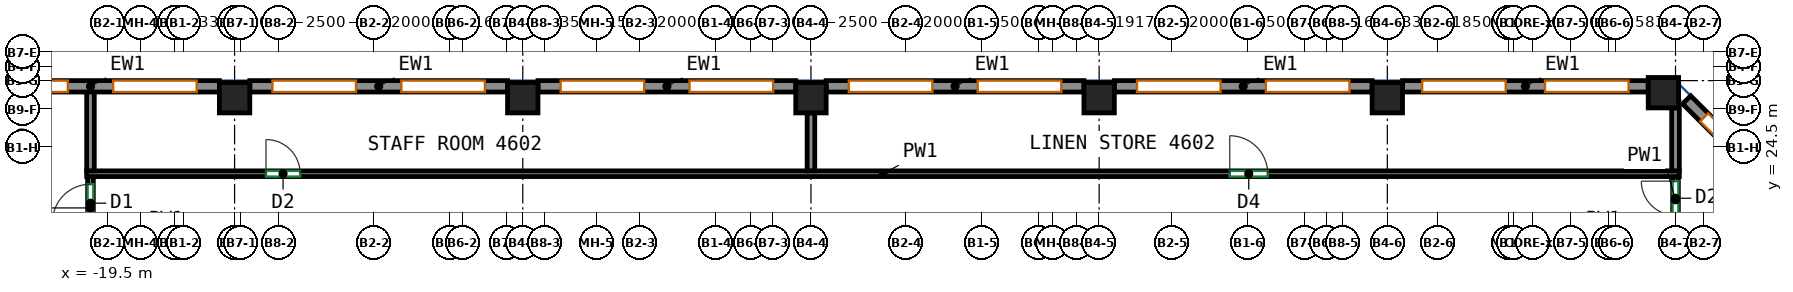
"""IFC4 building model, lengths in metres.
Left out: names, types, materials, properties, quantities, classifications, styles, units other than length and angle.
Written with IfcOpenShell. Run it as: python <this file> out.ifc"""

import sys

from ifc_helpers import new_model, si_unit, direction, frame, frame_2d, origin, origin_2d, place, context, subcontext, project, spatial, rectangle, extrude, source, transform, mapped, element, fill, save


model = new_model("IFC4")
c1 = context("Model", 3, precision=1e-05, world=origin(), true_north=direction((0.0, 1.0)))
c2 = subcontext(c1, "Body", "Model", "MODEL_VIEW")
j1 = project(units=[si_unit("LENGTHUNIT", "METRE"), si_unit("PLANEANGLEUNIT", "RADIAN")], contexts=[c1])
p1 = place(None, origin())
s1 = spatial("IfcSite", under=j1, at=p1, CompositionType="ELEMENT")
p2 = place(p1, origin())
s2 = spatial("IfcBuilding", under=s1, at=p2, CompositionType="ELEMENT")
p3 = place(p2, frame((0.0, 0.0, 192.3)))
s3 = spatial("IfcBuildingStorey", under=s2, at=p3, CompositionType="ELEMENT", Elevation=192.3)
m1 = source(origin(), c2, "Body", "SweptSolid", [
    extrude(rectangle(XDim=0.8, YDim=0.8, at=origin_2d()), origin(), (0.0, 0.0, 1.0), 3.0),
])
for number, where, z_axis, x_axis in (
    (1, (-16.167, 25.8, 0.0), (0.0, 0.0, 1.0), (1.0, 0.0, 0.0)),
    (2, (-8.583, 25.8, 0.0), (0.0, 0.0, 1.0), (1.0, 0.0, 0.0)),
    (3, (-1.0, 25.8, 0.0), (0.0, 0.0, 1.0), (1.0, 0.0, 0.0)),
    (4, (6.583, 25.8, 0.0), (0.0, 0.0, 1.0), (1.0, 0.0, 0.0)),
    (5, (14.167, 25.8, 0.0), (0.0, 0.0, 1.0), (1.0, 0.0, 0.0)),
    (6, (21.432, 25.932, 0.0), (0.0, 0.0, 1.0), (1.0, 0.0, 0.0)),
):
    element("IfcColumn", number, at=place(p3, frame(where, z_axis=z_axis, x_axis=x_axis)), inside=s3, PredefinedType="COLUMN", context=c2, shape_type="MappedRepresentation", body=[
        mapped(m1, transform((0.0, 0.0, 0.0))),
    ])
m2 = source(origin(), c2, "Body", "SweptSolid", [
    extrude(rectangle(XDim=3.5, YDim=0.3, at=frame_2d((1.75, 0.0))), origin(), (0.0, 0.0, 1.0), 3.0),
])
p4 = place(p3, frame((24.519, 23.269, 0.0), z_axis=(0.0, 0.0, 1.0), x_axis=(-0.70707190453, 0.707141656123, 0.0)))
e7 = element("IfcWall", 7, at=p4, inside=s3, PredefinedType="SOLIDWALL", context=c2, shape_type="MappedRepresentation", body=[
    mapped(m2, transform((0.0, 0.0, 0.0))),
])
p5 = place(p4, frame((0.65, 0.0, 0.85)))
e8 = element("IfcOpeningElement", 8, at=p5, cuts=e7, PredefinedType="OPENING", context=c2, shape_type="SweptSolid", body=[
    extrude(rectangle(XDim=2.2, YDim=1.95, at=frame_2d((1.1, 0.975))), frame((0.0, 0.16, 0.0), z_axis=(0.0, -1.0, 0.0), x_axis=(1.0, 0.0, 0.0)), (0.0, 0.0, 1.0), 0.32),
])
m3 = source(origin(), c2, "Body", "SweptSolid", [
    extrude(rectangle(XDim=6.465, YDim=0.3, at=frame_2d((3.232, 0.0))), origin(), (0.0, 0.0, 1.0), 3.0),
])
p6 = place(p3, frame((21.032, 26.1, 0.0), z_axis=(0.0, 0.0, 1.0), x_axis=(-1.0, 0.0, 0.0)))
e9 = element("IfcWall", 9, at=p6, inside=s3, PredefinedType="SOLIDWALL", context=c2, shape_type="MappedRepresentation", body=[
    mapped(m3, transform((0.0, 0.0, 0.0))),
])
p7 = place(p6, frame((0.516, 0.0, 0.85)))
e10 = element("IfcOpeningElement", 10, at=p7, cuts=e9, PredefinedType="OPENING", context=c2, shape_type="SweptSolid", body=[
    extrude(rectangle(XDim=2.2, YDim=1.95, at=frame_2d((1.1, 0.975))), frame((0.0, 0.16, 0.0), z_axis=(0.0, -1.0, 0.0), x_axis=(1.0, 0.0, 0.0)), (0.0, 0.0, 1.0), 0.32),
])
p8 = place(p6, frame((3.749, 0.0, 0.85)))
e11 = element("IfcOpeningElement", 11, at=p8, cuts=e9, PredefinedType="OPENING", context=c2, shape_type="SweptSolid", body=[
    extrude(rectangle(XDim=2.2, YDim=1.95, at=frame_2d((1.1, 0.975))), frame((0.0, 0.16, 0.0), z_axis=(0.0, -1.0, 0.0), x_axis=(1.0, 0.0, 0.0)), (0.0, 0.0, 1.0), 0.32),
])
m4 = source(origin(), c2, "Body", "SweptSolid", [
    extrude(rectangle(XDim=6.783, YDim=0.3, at=frame_2d((3.392, 0.0))), origin(), (0.0, 0.0, 1.0), 3.0),
])
p9 = place(p3, frame((13.767, 26.1, 0.0), z_axis=(0.0, 0.0, 1.0), x_axis=(-1.0, 0.0, 0.0)))
e12 = element("IfcWall", 12, at=p9, inside=s3, PredefinedType="SOLIDWALL", context=c2, shape_type="MappedRepresentation", body=[
    mapped(m4, transform((0.0, 0.0, 0.0))),
])
p10 = place(p9, frame((0.596, 0.0, 0.85)))
e13 = element("IfcOpeningElement", 13, at=p10, cuts=e12, PredefinedType="OPENING", context=c2, shape_type="SweptSolid", body=[
    extrude(rectangle(XDim=2.2, YDim=1.95, at=frame_2d((1.1, 0.975))), frame((0.0, 0.16, 0.0), z_axis=(0.0, -1.0, 0.0), x_axis=(1.0, 0.0, 0.0)), (0.0, 0.0, 1.0), 0.32),
])
p11 = place(p9, frame((3.988, 0.0, 0.85)))
e14 = element("IfcOpeningElement", 14, at=p11, cuts=e12, PredefinedType="OPENING", context=c2, shape_type="SweptSolid", body=[
    extrude(rectangle(XDim=2.2, YDim=1.95, at=frame_2d((1.1, 0.975))), frame((0.0, 0.16, 0.0), z_axis=(0.0, -1.0, 0.0), x_axis=(1.0, 0.0, 0.0)), (0.0, 0.0, 1.0), 0.32),
])
m5 = source(origin(), c2, "Body", "SweptSolid", [
    extrude(rectangle(XDim=6.783, YDim=0.3, at=frame_2d((3.392, 0.0))), origin(), (0.0, 0.0, 1.0), 3.0),
])
p12 = place(p3, frame((6.183, 26.1, 0.0), z_axis=(0.0, 0.0, 1.0), x_axis=(-1.0, 0.0, 0.0)))
e15 = element("IfcWall", 15, at=p12, inside=s3, PredefinedType="SOLIDWALL", context=c2, shape_type="MappedRepresentation", body=[
    mapped(m5, transform((0.0, 0.0, 0.0))),
])
p13 = place(p12, frame((0.596, 0.0, 0.85)))
e16 = element("IfcOpeningElement", 16, at=p13, cuts=e15, PredefinedType="OPENING", context=c2, shape_type="SweptSolid", body=[
    extrude(rectangle(XDim=2.2, YDim=1.95, at=frame_2d((1.1, 0.975))), frame((0.0, 0.16, 0.0), z_axis=(0.0, -1.0, 0.0), x_axis=(1.0, 0.0, 0.0)), (0.0, 0.0, 1.0), 0.32),
])
p14 = place(p12, frame((3.988, 0.0, 0.85)))
e17 = element("IfcOpeningElement", 17, at=p14, cuts=e15, PredefinedType="OPENING", context=c2, shape_type="SweptSolid", body=[
    extrude(rectangle(XDim=2.2, YDim=1.95, at=frame_2d((1.1, 0.975))), frame((0.0, 0.16, 0.0), z_axis=(0.0, -1.0, 0.0), x_axis=(1.0, 0.0, 0.0)), (0.0, 0.0, 1.0), 0.32),
])
p15 = place(p3, frame((-1.4, 26.1, 0.0), z_axis=(0.0, 0.0, 1.0), x_axis=(-1.0, 0.0, 0.0)))
e18 = element("IfcWall", 18, at=p15, inside=s3, PredefinedType="SOLIDWALL", context=c2, shape_type="MappedRepresentation", body=[
    mapped(m5, transform((0.0, 0.0, 0.0))),
])
p16 = place(p15, frame((0.596, 0.0, 0.85)))
e19 = element("IfcOpeningElement", 19, at=p16, cuts=e18, PredefinedType="OPENING", context=c2, shape_type="SweptSolid", body=[
    extrude(rectangle(XDim=2.2, YDim=1.95, at=frame_2d((1.1, 0.975))), frame((0.0, 0.16, 0.0), z_axis=(0.0, -1.0, 0.0), x_axis=(1.0, 0.0, 0.0)), (0.0, 0.0, 1.0), 0.32),
])
p17 = place(p15, frame((3.988, 0.0, 0.85)))
e20 = element("IfcOpeningElement", 20, at=p17, cuts=e18, PredefinedType="OPENING", context=c2, shape_type="SweptSolid", body=[
    extrude(rectangle(XDim=2.2, YDim=1.95, at=frame_2d((1.1, 0.975))), frame((0.0, 0.16, 0.0), z_axis=(0.0, -1.0, 0.0), x_axis=(1.0, 0.0, 0.0)), (0.0, 0.0, 1.0), 0.32),
])
p18 = place(p3, frame((-8.983, 26.1, 0.0), z_axis=(0.0, 0.0, 1.0), x_axis=(-1.0, 0.0, 0.0)))
e21 = element("IfcWall", 21, at=p18, inside=s3, PredefinedType="SOLIDWALL", context=c2, shape_type="MappedRepresentation", body=[
    mapped(m4, transform((0.0, 0.0, 0.0))),
])
p19 = place(p18, frame((0.596, 0.0, 0.85)))
e22 = element("IfcOpeningElement", 22, at=p19, cuts=e21, PredefinedType="OPENING", context=c2, shape_type="SweptSolid", body=[
    extrude(rectangle(XDim=2.2, YDim=1.95, at=frame_2d((1.1, 0.975))), frame((0.0, 0.16, 0.0), z_axis=(0.0, -1.0, 0.0), x_axis=(1.0, 0.0, 0.0)), (0.0, 0.0, 1.0), 0.32),
])
p20 = place(p18, frame((3.988, 0.0, 0.85)))
e23 = element("IfcOpeningElement", 23, at=p20, cuts=e21, PredefinedType="OPENING", context=c2, shape_type="SweptSolid", body=[
    extrude(rectangle(XDim=2.2, YDim=1.95, at=frame_2d((1.1, 0.975))), frame((0.0, 0.16, 0.0), z_axis=(0.0, -1.0, 0.0), x_axis=(1.0, 0.0, 0.0)), (0.0, 0.0, 1.0), 0.32),
])
p21 = place(p3, frame((-16.567, 26.1, 0.0), z_axis=(0.0, 0.0, 1.0), x_axis=(-1.0, 0.0, 0.0)))
e24 = element("IfcWall", 24, at=p21, inside=s3, PredefinedType="SOLIDWALL", context=c2, shape_type="MappedRepresentation", body=[
    mapped(m5, transform((0.0, 0.0, 0.0))),
])
p22 = place(p21, frame((0.596, 0.0, 0.85)))
e25 = element("IfcOpeningElement", 25, at=p22, cuts=e24, PredefinedType="OPENING", context=c2, shape_type="SweptSolid", body=[
    extrude(rectangle(XDim=2.2, YDim=1.95, at=frame_2d((1.1, 0.975))), frame((0.0, 0.16, 0.0), z_axis=(0.0, -1.0, 0.0), x_axis=(1.0, 0.0, 0.0)), (0.0, 0.0, 1.0), 0.32),
])
p23 = place(p21, frame((3.988, 0.0, 0.85)))
e26 = element("IfcOpeningElement", 26, at=p23, cuts=e24, PredefinedType="OPENING", context=c2, shape_type="SweptSolid", body=[
    extrude(rectangle(XDim=2.2, YDim=1.95, at=frame_2d((1.1, 0.975))), frame((0.0, 0.16, 0.0), z_axis=(0.0, -1.0, 0.0), x_axis=(1.0, 0.0, 0.0)), (0.0, 0.0, 1.0), 0.32),
])
p24 = place(p3, frame((-19.959, 22.075, 0.0), z_axis=(0.0, 0.0, 1.0), x_axis=(0.0, 1.0, 0.0)))
e27 = element("IfcWall", 27, at=p24, inside=s3, PredefinedType="PARTITIONING", context=c2, shape_type="SweptSolid", body=[
    extrude(rectangle(XDim=1.65, YDim=0.15, at=frame_2d((0.825, 0.0))), origin(), (0.0, 0.0, 1.0), 3.0),
])
p25 = place(p24, frame((0.45, 0.0, 0.0)))
e28 = element("IfcOpeningElement", 28, at=p25, cuts=e27, PredefinedType="OPENING", context=c2, shape_type="SweptSolid", body=[
    extrude(rectangle(XDim=1.0, YDim=2.1, at=frame_2d((0.5, 1.05))), frame((0.0, 0.085, 0.0), z_axis=(0.0, -1.0, 0.0), x_axis=(1.0, 0.0, 0.0)), (0.0, 0.0, 1.0), 0.17),
])
p26 = place(p3, frame((21.75, 22.503, 0.0), z_axis=(0.0, 0.0, 1.0), x_axis=(0.0, 1.0, 0.0)))
e29 = element("IfcWall", 29, at=p26, inside=s3, PredefinedType="PARTITIONING", context=c2, shape_type="SweptSolid", body=[
    extrude(rectangle(XDim=1.222, YDim=0.15, at=frame_2d((0.611, 0.0))), origin(), (0.0, 0.0, 1.0), 3.0),
])
p27 = place(p26, frame((0.202, 0.0, 0.0)))
e30 = element("IfcOpeningElement", 30, at=p27, cuts=e29, PredefinedType="OPENING", context=c2, shape_type="SweptSolid", body=[
    extrude(rectangle(XDim=0.9, YDim=2.1, at=frame_2d((0.45, 1.05))), frame((0.0, 0.085, 0.0), z_axis=(0.0, -1.0, 0.0), x_axis=(1.0, 0.0, 0.0)), (0.0, 0.0, 1.0), 0.17),
])
p28 = place(p3, frame((-20.059, 23.8, 0.0), z_axis=(0.0, 0.0, 1.0), x_axis=(1.0, 0.0, 0.0)))
e31 = element("IfcWall", 31, at=p28, inside=s3, PredefinedType="PARTITIONING", context=c2, shape_type="SweptSolid", body=[
    extrude(rectangle(XDim=41.909, YDim=0.15, at=frame_2d((20.955, 0.0))), origin(), (0.0, 0.0, 1.0), 3.0),
])
p29 = place(p28, frame((4.718, 0.0, 0.0)))
e32 = element("IfcOpeningElement", 32, at=p29, cuts=e31, PredefinedType="OPENING", context=c2, shape_type="SweptSolid", body=[
    extrude(rectangle(XDim=0.9, YDim=2.1, at=frame_2d((0.45, 1.05))), frame((0.0, 0.085, 0.0), z_axis=(0.0, -1.0, 0.0), x_axis=(1.0, 0.0, 0.0)), (0.0, 0.0, 1.0), 0.17),
])
p30 = place(p28, frame((30.079, 0.0, 0.0)))
e33 = element("IfcOpeningElement", 33, at=p30, cuts=e31, PredefinedType="OPENING", context=c2, shape_type="SweptSolid", body=[
    extrude(rectangle(XDim=1.0, YDim=2.1, at=frame_2d((0.5, 1.05))), frame((0.0, 0.085, 0.0), z_axis=(0.0, -1.0, 0.0), x_axis=(1.0, 0.0, 0.0)), (0.0, 0.0, 1.0), 0.17),
])
p31 = place(p3, frame((-19.959, 23.877, 0.0), z_axis=(0.0, 0.0, 1.0), x_axis=(0.0, 1.0, 0.0)))
e34 = element("IfcWall", 34, at=p31, inside=s3, PredefinedType="PARTITIONING", context=c2, shape_type="SweptSolid", body=[
    extrude(rectangle(XDim=2.123, YDim=0.2, at=frame_2d((1.062, 0.0))), origin(), (0.0, 0.0, 1.0), 3.0),
])
p32 = place(p3, frame((21.75, 25.532, 0.0), z_axis=(0.0, 0.0, 1.0), x_axis=(0.0, -1.0, 0.0)))
e35 = element("IfcWall", 35, at=p32, inside=s3, PredefinedType="PARTITIONING", context=c2, shape_type="SweptSolid", body=[
    extrude(rectangle(XDim=1.655, YDim=0.2, at=frame_2d((0.828, 0.0))), origin(), (0.0, 0.0, 1.0), 3.0),
])
p33 = place(p3, frame((-1.0, 23.877, 0.0), z_axis=(0.0, 0.0, 1.0), x_axis=(0.0, 1.0, 0.0)))
e36 = element("IfcWall", 36, at=p33, inside=s3, PredefinedType="PARTITIONING", context=c2, shape_type="SweptSolid", body=[
    extrude(rectangle(XDim=1.523, YDim=0.2, at=frame_2d((0.761, 0.0))), origin(), (0.0, 0.0, 1.0), 3.0),
])
p34 = place(p5, origin())
e37 = element("IfcWindow", 37, at=p34, inside=s3, PartitioningType="SINGLE_PANEL", PredefinedType="WINDOW", context=c2, shape_type="SweptSolid", body=[
    extrude(rectangle(XDim=2.2, YDim=1.95, at=frame_2d((1.1, 0.975))), frame((0.0, 0.03, 0.0), z_axis=(0.0, -1.0, 0.0), x_axis=(1.0, 0.0, 0.0)), (0.0, 0.0, 1.0), 0.06),
])
fill(e8, e37)
p35 = place(p7, origin())
e38 = element("IfcWindow", 38, at=p35, inside=s3, PartitioningType="SINGLE_PANEL", PredefinedType="WINDOW", context=c2, shape_type="SweptSolid", body=[
    extrude(rectangle(XDim=2.2, YDim=1.95, at=frame_2d((1.1, 0.975))), frame((0.0, 0.03, 0.0), z_axis=(0.0, -1.0, 0.0), x_axis=(1.0, 0.0, 0.0)), (0.0, 0.0, 1.0), 0.06),
])
fill(e10, e38)
p36 = place(p8, origin())
e39 = element("IfcWindow", 39, at=p36, inside=s3, PartitioningType="SINGLE_PANEL", PredefinedType="WINDOW", context=c2, shape_type="SweptSolid", body=[
    extrude(rectangle(XDim=2.2, YDim=1.95, at=frame_2d((1.1, 0.975))), frame((0.0, 0.03, 0.0), z_axis=(0.0, -1.0, 0.0), x_axis=(1.0, 0.0, 0.0)), (0.0, 0.0, 1.0), 0.06),
])
fill(e11, e39)
p37 = place(p10, origin())
e40 = element("IfcWindow", 40, at=p37, inside=s3, PartitioningType="SINGLE_PANEL", PredefinedType="WINDOW", context=c2, shape_type="SweptSolid", body=[
    extrude(rectangle(XDim=2.2, YDim=1.95, at=frame_2d((1.1, 0.975))), frame((0.0, 0.03, 0.0), z_axis=(0.0, -1.0, 0.0), x_axis=(1.0, 0.0, 0.0)), (0.0, 0.0, 1.0), 0.06),
])
fill(e13, e40)
p38 = place(p11, origin())
e41 = element("IfcWindow", 41, at=p38, inside=s3, PartitioningType="SINGLE_PANEL", PredefinedType="WINDOW", context=c2, shape_type="SweptSolid", body=[
    extrude(rectangle(XDim=2.2, YDim=1.95, at=frame_2d((1.1, 0.975))), frame((0.0, 0.03, 0.0), z_axis=(0.0, -1.0, 0.0), x_axis=(1.0, 0.0, 0.0)), (0.0, 0.0, 1.0), 0.06),
])
fill(e14, e41)
p39 = place(p13, origin())
e42 = element("IfcWindow", 42, at=p39, inside=s3, PartitioningType="SINGLE_PANEL", PredefinedType="WINDOW", context=c2, shape_type="SweptSolid", body=[
    extrude(rectangle(XDim=2.2, YDim=1.95, at=frame_2d((1.1, 0.975))), frame((0.0, 0.03, 0.0), z_axis=(0.0, -1.0, 0.0), x_axis=(1.0, 0.0, 0.0)), (0.0, 0.0, 1.0), 0.06),
])
fill(e16, e42)
p40 = place(p14, origin())
e43 = element("IfcWindow", 43, at=p40, inside=s3, PartitioningType="SINGLE_PANEL", PredefinedType="WINDOW", context=c2, shape_type="SweptSolid", body=[
    extrude(rectangle(XDim=2.2, YDim=1.95, at=frame_2d((1.1, 0.975))), frame((0.0, 0.03, 0.0), z_axis=(0.0, -1.0, 0.0), x_axis=(1.0, 0.0, 0.0)), (0.0, 0.0, 1.0), 0.06),
])
fill(e17, e43)
p41 = place(p16, origin())
e44 = element("IfcWindow", 44, at=p41, inside=s3, PartitioningType="SINGLE_PANEL", PredefinedType="WINDOW", context=c2, shape_type="SweptSolid", body=[
    extrude(rectangle(XDim=2.2, YDim=1.95, at=frame_2d((1.1, 0.975))), frame((0.0, 0.03, 0.0), z_axis=(0.0, -1.0, 0.0), x_axis=(1.0, 0.0, 0.0)), (0.0, 0.0, 1.0), 0.06),
])
fill(e19, e44)
p42 = place(p17, origin())
e45 = element("IfcWindow", 45, at=p42, inside=s3, PartitioningType="SINGLE_PANEL", PredefinedType="WINDOW", context=c2, shape_type="SweptSolid", body=[
    extrude(rectangle(XDim=2.2, YDim=1.95, at=frame_2d((1.1, 0.975))), frame((0.0, 0.03, 0.0), z_axis=(0.0, -1.0, 0.0), x_axis=(1.0, 0.0, 0.0)), (0.0, 0.0, 1.0), 0.06),
])
fill(e20, e45)
p43 = place(p19, origin())
e46 = element("IfcWindow", 46, at=p43, inside=s3, PartitioningType="SINGLE_PANEL", PredefinedType="WINDOW", context=c2, shape_type="SweptSolid", body=[
    extrude(rectangle(XDim=2.2, YDim=1.95, at=frame_2d((1.1, 0.975))), frame((0.0, 0.03, 0.0), z_axis=(0.0, -1.0, 0.0), x_axis=(1.0, 0.0, 0.0)), (0.0, 0.0, 1.0), 0.06),
])
fill(e22, e46)
p44 = place(p20, origin())
e47 = element("IfcWindow", 47, at=p44, inside=s3, PartitioningType="SINGLE_PANEL", PredefinedType="WINDOW", context=c2, shape_type="SweptSolid", body=[
    extrude(rectangle(XDim=2.2, YDim=1.95, at=frame_2d((1.1, 0.975))), frame((0.0, 0.03, 0.0), z_axis=(0.0, -1.0, 0.0), x_axis=(1.0, 0.0, 0.0)), (0.0, 0.0, 1.0), 0.06),
])
fill(e23, e47)
p45 = place(p22, origin())
e48 = element("IfcWindow", 48, at=p45, inside=s3, PartitioningType="SINGLE_PANEL", PredefinedType="WINDOW", context=c2, shape_type="SweptSolid", body=[
    extrude(rectangle(XDim=2.2, YDim=1.95, at=frame_2d((1.1, 0.975))), frame((0.0, 0.03, 0.0), z_axis=(0.0, -1.0, 0.0), x_axis=(1.0, 0.0, 0.0)), (0.0, 0.0, 1.0), 0.06),
])
fill(e25, e48)
p46 = place(p23, origin())
e49 = element("IfcWindow", 49, at=p46, inside=s3, PartitioningType="SINGLE_PANEL", PredefinedType="WINDOW", context=c2, shape_type="SweptSolid", body=[
    extrude(rectangle(XDim=2.2, YDim=1.95, at=frame_2d((1.1, 0.975))), frame((0.0, 0.03, 0.0), z_axis=(0.0, -1.0, 0.0), x_axis=(1.0, 0.0, 0.0)), (0.0, 0.0, 1.0), 0.06),
])
fill(e26, e49)
p47 = place(p25, origin())
e50 = element("IfcDoor", 50, at=p47, inside=s3, OperationType="SINGLE_SWING_LEFT", PredefinedType="DOOR", context=c2, shape_type="SweptSolid", body=[
    extrude(rectangle(XDim=1.0, YDim=2.1, at=frame_2d((0.5, 1.05))), frame((0.0, 0.025, 0.0), z_axis=(0.0, -1.0, 0.0), x_axis=(1.0, 0.0, 0.0)), (0.0, 0.0, 1.0), 0.05),
])
fill(e28, e50)
p48 = place(p27, origin())
e51 = element("IfcDoor", 51, at=p48, inside=s3, OperationType="SINGLE_SWING_RIGHT", PredefinedType="DOOR", context=c2, shape_type="SweptSolid", body=[
    extrude(rectangle(XDim=0.9, YDim=2.1, at=frame_2d((0.45, 1.05))), frame((0.0, 0.025, 0.0), z_axis=(0.0, -1.0, 0.0), x_axis=(1.0, 0.0, 0.0)), (0.0, 0.0, 1.0), 0.05),
])
fill(e30, e51)
p49 = place(p29, origin())
e52 = element("IfcDoor", 52, at=p49, inside=s3, OperationType="SINGLE_SWING_LEFT", PredefinedType="DOOR", context=c2, shape_type="SweptSolid", body=[
    extrude(rectangle(XDim=0.9, YDim=2.1, at=frame_2d((0.45, 1.05))), frame((0.0, 0.025, 0.0), z_axis=(0.0, -1.0, 0.0), x_axis=(1.0, 0.0, 0.0)), (0.0, 0.0, 1.0), 0.05),
])
fill(e32, e52)
p50 = place(p30, origin())
e53 = element("IfcDoor", 53, at=p50, inside=s3, OperationType="SINGLE_SWING_LEFT", PredefinedType="DOOR", context=c2, shape_type="SweptSolid", body=[
    extrude(rectangle(XDim=1.0, YDim=2.1, at=frame_2d((0.5, 1.05))), frame((0.0, 0.025, 0.0), z_axis=(0.0, -1.0, 0.0), x_axis=(1.0, 0.0, 0.0)), (0.0, 0.0, 1.0), 0.05),
])
fill(e33, e53)
save(model, sys.argv[1])
